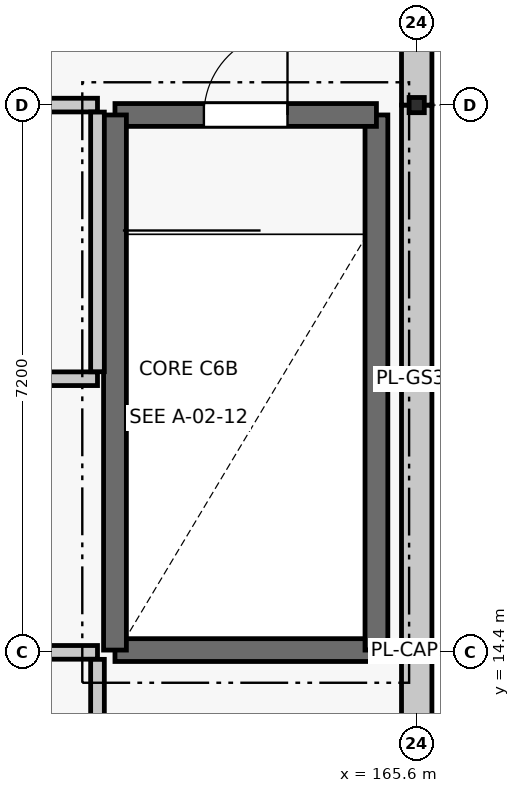
"""IFC4 building model, lengths in metres.
Left out: names, types, materials, properties, quantities, classifications, styles, units other than length and angle.
Written with IfcOpenShell. Run it as: python <this file> out.ifc"""

import sys

from ifc_helpers import new_model, si_unit, direction, frame, frame_2d, origin, origin_2d, place, context, subcontext, project, spatial, rectangle, i_section, extrude, element, fill, save


model = new_model("IFC4")
c1 = context("Model", 3, precision=1e-05, world=origin(), true_north=direction((0.0, 1.0)))
c2 = subcontext(c1, "Body", "Model", "MODEL_VIEW")
j1 = project(units=[si_unit("LENGTHUNIT", "METRE"), si_unit("PLANEANGLEUNIT", "RADIAN")], contexts=[c1])
p1 = place(None, origin())
s1 = spatial("IfcSite", under=j1, at=p1, CompositionType="ELEMENT")
p2 = place(p1, origin())
s2 = spatial("IfcBuilding", under=s1, at=p2, CompositionType="ELEMENT")
p3 = place(p2, frame((0.0, 0.0, 14.4)))
s3 = spatial("IfcBuildingStorey", under=s2, at=p3, CompositionType="ELEMENT", Elevation=14.4)
for number, where, z_axis, x_axis in (
    (1, (165.6, 14.4, 0.0), (0.0, 0.0, 1.0), (1.0, 0.0, 0.0)),
    (2, (165.6, 21.6, 0.0), (0.0, 0.0, 1.0), (1.0, 0.0, 0.0)),
):
    element("IfcColumn", number, at=place(p3, frame(where, z_axis=z_axis, x_axis=x_axis)), inside=s3, PredefinedType="COLUMN", context=c2, shape_type="SweptSolid", body=[
        extrude(i_section(OverallWidth=0.2, OverallDepth=0.2, WebThickness=0.009, FlangeThickness=0.015, FilletRadius=0.018, at=origin_2d()), origin(), (0.0, 0.0, 1.0), 4.2),
    ])
p4 = place(p3, frame((165.6, 7.2, 0.0), z_axis=(0.0, 0.0, 1.0), x_axis=(0.0, 1.0, 0.0)))
e3 = element("IfcWall", 3, at=p4, inside=s3, PredefinedType="SOLIDWALL", context=c2, shape_type="SweptSolid", body=[
    extrude(rectangle(XDim=7.2, YDim=0.4, at=frame_2d((3.6, 0.0))), origin(), (0.0, 0.0, 1.0), 3.24),
])
p5 = place(p4, frame((2.9, 0.0, 0.95)))
e4 = element("IfcOpeningElement", 4, at=p5, cuts=e3, PredefinedType="OPENING", context=c2, shape_type="SweptSolid", body=[
    extrude(rectangle(XDim=1.4, YDim=1.85, at=frame_2d((0.7, 0.925))), frame((0.0, 0.212, 0.0), z_axis=(0.0, -1.0, 0.0), x_axis=(1.0, 0.0, 0.0)), (0.0, 0.0, 1.0), 0.424),
])
p6 = place(p3, frame((165.6, 14.4, 0.0), z_axis=(0.0, 0.0, 1.0), x_axis=(0.0, 1.0, 0.0)))
e5 = element("IfcWall", 5, at=p6, inside=s3, PredefinedType="SOLIDWALL", context=c2, shape_type="SweptSolid", body=[
    extrude(rectangle(XDim=7.2, YDim=0.4, at=frame_2d((3.6, 0.0))), origin(), (0.0, 0.0, 1.0), 3.24),
])
p7 = place(p3, frame((165.6, 21.6, 0.0), z_axis=(0.0, 0.0, 1.0), x_axis=(0.0, 1.0, 0.0)))
e6 = element("IfcWall", 6, at=p7, inside=s3, PredefinedType="SOLIDWALL", context=c2, shape_type="SweptSolid", body=[
    extrude(rectangle(XDim=7.096, YDim=0.4, at=frame_2d((3.548, 0.0))), origin(), (0.0, 0.0, 1.0), 3.24),
])
p8 = place(p7, frame((2.9, 0.0, 0.95)))
e7 = element("IfcOpeningElement", 7, at=p8, cuts=e6, PredefinedType="OPENING", context=c2, shape_type="SweptSolid", body=[
    extrude(rectangle(XDim=1.4, YDim=1.85, at=frame_2d((0.7, 0.925))), frame((0.0, 0.212, 0.0), z_axis=(0.0, -1.0, 0.0), x_axis=(1.0, 0.0, 0.0)), (0.0, 0.0, 1.0), 0.424),
])
p9 = place(p3, frame((161.63, 14.43, 0.0), z_axis=(0.0, 0.0, 1.0), x_axis=(1.0, 0.0, 0.0)))
e8 = element("IfcWall", 8, at=p9, inside=s3, PredefinedType="SHEAR", context=c2, shape_type="SweptSolid", body=[
    extrude(rectangle(XDim=3.44, YDim=0.3, at=frame_2d((1.72, 0.0))), origin(), (0.0, 0.0, 1.0), 3.96),
])
p10 = place(p3, frame((165.07, 14.43, 0.0), z_axis=(0.0, 0.0, 1.0), x_axis=(0.0, 1.0, 0.0)))
e9 = element("IfcWall", 9, at=p10, inside=s3, PredefinedType="SHEAR", context=c2, shape_type="SweptSolid", body=[
    extrude(rectangle(XDim=7.04, YDim=0.3, at=frame_2d((3.52, 0.0))), origin(), (0.0, 0.0, 1.0), 3.96),
])
p11 = place(p3, frame((165.07, 21.47, 0.0), z_axis=(0.0, 0.0, 1.0), x_axis=(-1.0, 0.0, 0.0)))
e10 = element("IfcWall", 10, at=p11, inside=s3, PredefinedType="SHEAR", context=c2, shape_type="SweptSolid", body=[
    extrude(rectangle(XDim=3.44, YDim=0.3, at=frame_2d((1.72, 0.0))), origin(), (0.0, 0.0, 1.0), 3.96),
])
p12 = place(p11, frame((1.17, 0.0, 0.0)))
e11 = element("IfcOpeningElement", 11, at=p12, cuts=e10, PredefinedType="OPENING", context=c2, shape_type="SweptSolid", body=[
    extrude(rectangle(XDim=1.1, YDim=2.15, at=frame_2d((0.55, 1.075))), frame((0.0, 0.162, 0.0), z_axis=(0.0, -1.0, 0.0), x_axis=(1.0, 0.0, 0.0)), (0.0, 0.0, 1.0), 0.324),
])
p13 = place(p3, frame((161.63, 21.47, 0.0), z_axis=(0.0, 0.0, 1.0), x_axis=(0.0, -1.0, 0.0)))
e12 = element("IfcWall", 12, at=p13, inside=s3, PredefinedType="SHEAR", context=c2, shape_type="SweptSolid", body=[
    extrude(rectangle(XDim=7.04, YDim=0.3, at=frame_2d((3.52, 0.0))), origin(), (0.0, 0.0, 1.0), 3.96),
])
p14 = place(p3, frame((158.504, 14.4, 0.0), z_axis=(0.0, 0.0, 1.0), x_axis=(1.0, 0.0, 0.0)))
e13 = element("IfcWall", 13, at=p14, inside=s3, PredefinedType="PARTITIONING", context=c2, shape_type="SweptSolid", body=[
    extrude(rectangle(XDim=2.896, YDim=0.18, at=frame_2d((1.448, 0.0))), origin(), (0.0, 0.0, 1.0), 3.595),
])
p15 = place(p3, frame((154.802, 18.0, 0.0), z_axis=(0.0, 0.0, 1.0), x_axis=(1.0, 0.0, 0.0)))
e14 = element("IfcWall", 14, at=p15, inside=s3, PredefinedType="PARTITIONING", context=c2, shape_type="SweptSolid", body=[
    extrude(rectangle(XDim=6.598, YDim=0.18, at=frame_2d((3.299, 0.0))), origin(), (0.0, 0.0, 1.0), 3.595),
])
p16 = place(p3, frame((158.504, 21.6, 0.0), z_axis=(0.0, 0.0, 1.0), x_axis=(1.0, 0.0, 0.0)))
e15 = element("IfcWall", 15, at=p16, inside=s3, PredefinedType="PARTITIONING", context=c2, shape_type="SweptSolid", body=[
    extrude(rectangle(XDim=2.896, YDim=0.18, at=frame_2d((1.448, 0.0))), origin(), (0.0, 0.0, 1.0), 3.595),
])
p17 = place(p3, frame((161.4, 0.055, 0.0), z_axis=(0.0, 0.0, 1.0), x_axis=(0.0, 1.0, 0.0)))
e16 = element("IfcWall", 16, at=p17, inside=s3, PredefinedType="PARTITIONING", context=c2, shape_type="SweptSolid", body=[
    extrude(rectangle(XDim=14.253, YDim=0.18, at=frame_2d((7.126, 0.0))), origin(), (0.0, 0.0, 1.0), 3.395),
])
p18 = place(p3, frame((161.4, 18.092, 0.0), z_axis=(0.0, 0.0, 1.0), x_axis=(0.0, 1.0, 0.0)))
e17 = element("IfcWall", 17, at=p18, inside=s3, PredefinedType="PARTITIONING", context=c2, shape_type="SweptSolid", body=[
    extrude(rectangle(XDim=3.416, YDim=0.18, at=frame_2d((1.708, 0.0))), origin(), (0.0, 0.0, 1.0), 3.695),
])
p19 = place(p12, frame((1.1, 0.0, 0.0), z_axis=(0.0, 0.0, 1.0), x_axis=(-1.0, 0.0, 0.0)))
e18 = element("IfcDoor", 18, at=p19, inside=s3, OperationType="SINGLE_SWING_RIGHT", PredefinedType="DOOR", context=c2, shape_type="SweptSolid", body=[
    extrude(rectangle(XDim=1.1, YDim=2.15, at=frame_2d((0.55, 1.075))), frame((0.0, 0.025, 0.0), z_axis=(0.0, -1.0, 0.0), x_axis=(1.0, 0.0, 0.0)), (0.0, 0.0, 1.0), 0.05),
])
fill(e11, e18)
save(model, sys.argv[1])
